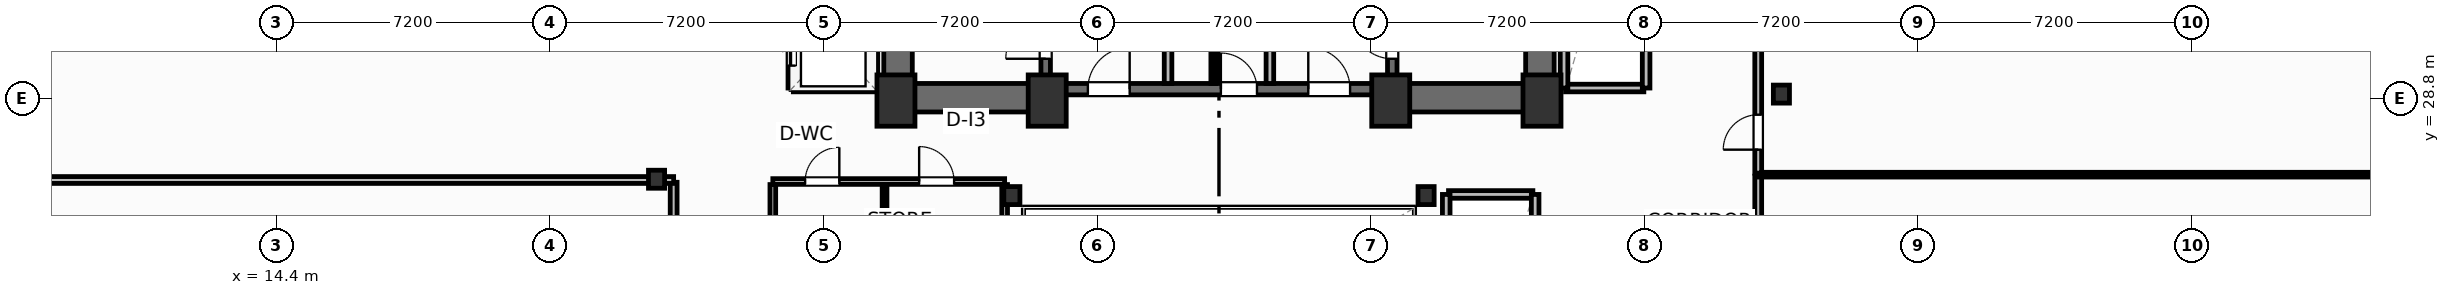
"""IFC4 building model, lengths in metres.
Left out: names, types, materials, properties, quantities, classifications, styles, units other than length and angle.
Written with IfcOpenShell. Run it as: python <this file> out.ifc"""

import sys

from ifc_helpers import new_model, si_unit, direction, frame, frame_2d, origin, origin_2d, place, context, subcontext, project, spatial, rectangle, i_section, extrude, element, fill, save


model = new_model("IFC4")
c1 = context("Model", 3, precision=1e-05, world=origin(), true_north=direction((0.0, 1.0)))
c2 = subcontext(c1, "Body", "Model", "MODEL_VIEW")
j1 = project(units=[si_unit("LENGTHUNIT", "METRE"), si_unit("PLANEANGLEUNIT", "RADIAN")], contexts=[c1])
p1 = place(None, origin())
s1 = spatial("IfcSite", under=j1, at=p1, CompositionType="ELEMENT")
p2 = place(p1, origin())
s2 = spatial("IfcBuilding", under=s1, at=p2, CompositionType="ELEMENT")
p3 = place(p2, frame((0.0, 0.0, 83.6)))
s3 = spatial("IfcBuildingStorey", under=s2, at=p3, CompositionType="ELEMENT", Elevation=83.6)
for number, where, z_axis, x_axis in (
    (1, (30.7, 28.75, 0.0), (0.0, 0.0, 1.0), (1.0, 0.0, 0.0)),
    (2, (34.68, 28.75, 0.0), (0.0, 0.0, 1.0), (1.0, 0.0, 0.0)),
    (3, (43.72, 28.75, 0.0), (0.0, 0.0, 1.0), (1.0, 0.0, 0.0)),
    (4, (47.7, 28.75, 0.0), (0.0, 0.0, 1.0), (1.0, 0.0, 0.0)),
):
    element("IfcColumn", number, at=place(p3, frame(where, z_axis=z_axis, x_axis=x_axis)), inside=s3, PredefinedType="COLUMN", context=c2, shape_type="SweptSolid", body=[
        extrude(rectangle(XDim=1.0, YDim=1.35, at=origin_2d()), origin(), (0.0, 0.0, 1.0), 3.7),
    ])
for number, where, z_axis, x_axis in (
    (5, (33.75, 26.25, 0.0), (0.0, 0.0, 1.0), (1.0, 0.0, 0.0)),
    (6, (44.65, 26.25, 0.0), (0.0, 0.0, 1.0), (1.0, 0.0, 0.0)),
    (7, (24.4, 26.68, 0.0), (0.0, 0.0, 1.0), (1.0, 0.0, 0.0)),
    (8, (54.0, 28.92, 0.0), (0.0, 0.0, 1.0), (1.0, 0.0, 0.0)),
):
    element("IfcColumn", number, at=place(p3, frame(where, z_axis=z_axis, x_axis=x_axis)), inside=s3, PredefinedType="COLUMN", context=c2, shape_type="SweptSolid", body=[
        extrude(i_section(OverallWidth=0.424, OverallDepth=0.474, WebThickness=0.048, FlangeThickness=0.077, FilletRadius=0.025, at=origin_2d()), origin(), (0.0, 0.0, 1.0), 3.7),
    ])
for number, where, z_axis, x_axis in (
    (9, (30.755, 29.2, 0.0), (0.0, 0.0, 1.0), (0.0, 1.0, 0.0)),
    (10, (47.645, 29.2, 0.0), (0.0, 0.0, 1.0), (0.0, 1.0, 0.0)),
):
    element("IfcWall", number, at=place(p3, frame(where, z_axis=z_axis, x_axis=x_axis)), inside=s3, PredefinedType="SHEAR", context=c2, shape_type="SweptSolid", body=[
        extrude(rectangle(XDim=9.22, YDim=0.75, at=frame_2d((4.61, 0.0))), origin(), (0.0, 0.0, 1.0), 3.45),
    ])
p4 = place(p3, frame((30.38, 28.825, 0.0), z_axis=(0.0, 0.0, 1.0), x_axis=(1.0, 0.0, 0.0)))
e11 = element("IfcWall", 11, at=p4, inside=s3, PredefinedType="SHEAR", context=c2, shape_type="SweptSolid", body=[
    extrude(rectangle(XDim=4.42, YDim=0.75, at=frame_2d((2.21, 0.0))), origin(), (0.0, 0.0, 1.0), 3.45),
])
p5 = place(p3, frame((43.6, 28.825, 0.0), z_axis=(0.0, 0.0, 1.0), x_axis=(1.0, 0.0, 0.0)))
e12 = element("IfcWall", 12, at=p5, inside=s3, PredefinedType="SHEAR", context=c2, shape_type="SweptSolid", body=[
    extrude(rectangle(XDim=4.42, YDim=0.75, at=frame_2d((2.21, 0.0))), origin(), (0.0, 0.0, 1.0), 3.45),
])
p6 = place(p3, frame((34.8, 29.05, 0.0), z_axis=(0.0, 0.0, 1.0), x_axis=(1.0, 0.0, 0.0)))
e13 = element("IfcWall", 13, at=p6, inside=s3, PredefinedType="SHEAR", context=c2, shape_type="SweptSolid", body=[
    extrude(rectangle(XDim=8.8, YDim=0.3, at=frame_2d((4.4, 0.0))), origin(), (0.0, 0.0, 1.0), 3.45),
])
p7 = place(p6, frame((0.95, 0.0, 0.0)))
e14 = element("IfcOpeningElement", 14, at=p7, cuts=e13, PredefinedType="OPENING", context=c2, shape_type="SweptSolid", body=[
    extrude(rectangle(XDim=1.1, YDim=2.15, at=frame_2d((0.55, 1.075))), frame((0.0, 0.16, 0.0), z_axis=(0.0, -1.0, 0.0), x_axis=(1.0, 0.0, 0.0)), (0.0, 0.0, 1.0), 0.32),
])
p8 = place(p6, frame((6.75, 0.0, 0.0)))
e15 = element("IfcOpeningElement", 15, at=p8, cuts=e13, PredefinedType="OPENING", context=c2, shape_type="SweptSolid", body=[
    extrude(rectangle(XDim=1.1, YDim=2.15, at=frame_2d((0.55, 1.075))), frame((0.0, 0.16, 0.0), z_axis=(0.0, -1.0, 0.0), x_axis=(1.0, 0.0, 0.0)), (0.0, 0.0, 1.0), 0.32),
])
p9 = place(p6, frame((4.45, 0.0, 0.0)))
e16 = element("IfcOpeningElement", 16, at=p9, cuts=e13, PredefinedType="OPENING", context=c2, shape_type="SweptSolid", body=[
    extrude(rectangle(XDim=0.95, YDim=2.15, at=frame_2d((0.475, 1.075))), frame((0.0, 0.16, 0.0), z_axis=(0.0, -1.0, 0.0), x_axis=(1.0, 0.0, 0.0)), (0.0, 0.0, 1.0), 0.32),
])
p10 = place(p3, frame((34.64, 29.2, 0.0), z_axis=(0.0, 0.0, 1.0), x_axis=(0.0, 1.0, 0.0)))
e17 = element("IfcWall", 17, at=p10, inside=s3, PredefinedType="SHEAR", context=c2, shape_type="SweptSolid", body=[
    extrude(rectangle(XDim=9.22, YDim=0.25, at=frame_2d((4.61, 0.0))), origin(), (0.0, 0.0, 1.0), 3.45),
])
p11 = place(p10, frame((0.65, 0.0, 0.0)))
e18 = element("IfcOpeningElement", 18, at=p11, cuts=e17, PredefinedType="OPENING", context=c2, shape_type="SweptSolid", body=[
    extrude(rectangle(XDim=1.05, YDim=2.15, at=frame_2d((0.525, 1.075))), frame((0.0, 0.135, 0.0), z_axis=(0.0, -1.0, 0.0), x_axis=(1.0, 0.0, 0.0)), (0.0, 0.0, 1.0), 0.27),
])
p12 = place(p3, frame((43.76, 29.2, 0.0), z_axis=(0.0, 0.0, 1.0), x_axis=(0.0, 1.0, 0.0)))
e19 = element("IfcWall", 19, at=p12, inside=s3, PredefinedType="SHEAR", context=c2, shape_type="SweptSolid", body=[
    extrude(rectangle(XDim=9.22, YDim=0.25, at=frame_2d((4.61, 0.0))), origin(), (0.0, 0.0, 1.0), 3.45),
])
p13 = place(p12, frame((0.65, 0.0, 0.0)))
e20 = element("IfcOpeningElement", 20, at=p13, cuts=e19, PredefinedType="OPENING", context=c2, shape_type="SweptSolid", body=[
    extrude(rectangle(XDim=1.05, YDim=2.15, at=frame_2d((0.525, 1.075))), frame((0.0, 0.135, 0.0), z_axis=(0.0, -1.0, 0.0), x_axis=(1.0, 0.0, 0.0)), (0.0, 0.0, 1.0), 0.27),
])
p14 = place(p3, frame((24.85, 23.03, 0.0), z_axis=(0.0, 0.0, 1.0), x_axis=(0.0, 1.0, 0.0)))
e21 = element("IfcWall", 21, at=p14, inside=s3, PredefinedType="PARTITIONING", context=c2, shape_type="SweptSolid", body=[
    extrude(rectangle(XDim=3.57, YDim=0.18, at=frame_2d((1.785, 0.0))), origin(), (0.0, 0.0, 1.0), 3.45),
])
p15 = place(p14, frame((1.5, 0.0, 0.0)))
e22 = element("IfcOpeningElement", 22, at=p15, cuts=e21, PredefinedType="OPENING", context=c2, shape_type="SweptSolid", body=[
    extrude(rectangle(XDim=0.92, YDim=2.05, at=frame_2d((0.46, 1.025))), frame((0.0, 0.1, 0.0), z_axis=(0.0, -1.0, 0.0), x_axis=(1.0, 0.0, 0.0)), (0.0, 0.0, 1.0), 0.2),
])
p16 = place(p3, frame((-0.086, 26.66, 0.0), z_axis=(0.0, 0.0, 1.0), x_axis=(1.0, 0.0, 0.0)))
e23 = element("IfcWall", 23, at=p16, inside=s3, PredefinedType="PARTITIONING", context=c2, shape_type="SweptSolid", body=[
    extrude(rectangle(XDim=24.936, YDim=0.18, at=frame_2d((12.468, 0.0))), origin(), (0.0, 0.0, 1.0), 2.662),
])
p17 = place(p3, frame((53.39, 19.24, 0.0), z_axis=(0.0, 0.0, 1.0), x_axis=(0.0, 1.0, 0.0)))
e24 = element("IfcWall", 24, at=p17, inside=s3, PredefinedType="PARTITIONING", context=c2, shape_type="SweptSolid", body=[
    extrude(rectangle(XDim=7.52, YDim=0.18, at=frame_2d((3.76, 0.0))), origin(), (0.0, 0.0, 1.0), 3.45),
])
p18 = place(p17, frame((2.1, 0.0, 0.0)))
e25 = element("IfcOpeningElement", 25, at=p18, cuts=e24, PredefinedType="OPENING", context=c2, shape_type="SweptSolid", body=[
    extrude(rectangle(XDim=0.92, YDim=2.05, at=frame_2d((0.46, 1.025))), frame((0.0, 0.1, 0.0), z_axis=(0.0, -1.0, 0.0), x_axis=(1.0, 0.0, 0.0)), (0.0, 0.0, 1.0), 0.2),
])
p19 = place(p3, frame((53.39, 26.8, 0.0), z_axis=(0.0, 0.0, 1.0), x_axis=(1.0, 0.0, 0.0)))
e26 = element("IfcWall", 26, at=p19, inside=s3, PredefinedType="PARTITIONING", context=c2, shape_type="SweptSolid", body=[
    extrude(rectangle(XDim=23.61, YDim=0.125, at=frame_2d((11.805, 0.0))), origin(), (0.0, 0.0, 1.0), 3.45),
])
p20 = place(p3, frame((53.39, 26.84, 0.0), z_axis=(0.0, 0.0, 1.0), x_axis=(0.0, 1.0, 0.0)))
e27 = element("IfcWall", 27, at=p20, inside=s3, PredefinedType="PARTITIONING", context=c2, shape_type="SweptSolid", body=[
    extrude(rectangle(XDim=12.46, YDim=0.18, at=frame_2d((6.23, 0.0))), origin(), (0.0, 0.0, 1.0), 3.45),
])
p21 = place(p20, frame((0.618, 0.0, 0.0)))
e28 = element("IfcOpeningElement", 28, at=p21, cuts=e27, PredefinedType="OPENING", context=c2, shape_type="SweptSolid", body=[
    extrude(rectangle(XDim=0.92, YDim=2.05, at=frame_2d((0.46, 1.025))), frame((0.0, 0.1, 0.0), z_axis=(0.0, -1.0, 0.0), x_axis=(1.0, 0.0, 0.0)), (0.0, 0.0, 1.0), 0.2),
])
for number, where, z_axis, x_axis in (
    (29, (37.86, 29.2, 0.0), (0.0, 0.0, 1.0), (0.0, 1.0, 0.0)),
    (30, (40.54, 29.2, 0.0), (0.0, 0.0, 1.0), (0.0, 1.0, 0.0)),
):
    element("IfcWall", number, at=place(p3, frame(where, z_axis=z_axis, x_axis=x_axis)), inside=s3, PredefinedType="PARTITIONING", context=c2, shape_type="SweptSolid", body=[
        extrude(rectangle(XDim=5.18, YDim=0.2, at=frame_2d((2.59, 0.0))), origin(), (0.0, 0.0, 1.0), 3.45),
    ])
p22 = place(p3, frame((39.05, 29.2, 0.0), z_axis=(0.0, 0.0, 1.0), x_axis=(0.0, 1.0, 0.0)))
e31 = element("IfcWall", 31, at=p22, inside=s3, PredefinedType="PARTITIONING", context=c2, shape_type="SweptSolid", body=[
    extrude(rectangle(XDim=5.22, YDim=0.125, at=frame_2d((2.61, 0.0))), origin(), (0.0, 0.0, 1.0), 3.45),
])
p23 = place(p22, frame((2.05, 0.0, 0.0)))
e32 = element("IfcOpeningElement", 32, at=p23, cuts=e31, PredefinedType="OPENING", context=c2, shape_type="SweptSolid", body=[
    extrude(rectangle(XDim=0.85, YDim=2.05, at=frame_2d((0.425, 1.025))), frame((0.0, 0.073, 0.0), z_axis=(0.0, -1.0, 0.0), x_axis=(1.0, 0.0, 0.0)), (0.0, 0.0, 1.0), 0.145),
])
p24 = place(p3, frame((27.46, 26.62, 0.0), z_axis=(0.0, 0.0, 1.0), x_axis=(1.0, 0.0, 0.0)))
e33 = element("IfcWall", 33, at=p24, inside=s3, PredefinedType="PARTITIONING", context=c2, shape_type="SweptSolid", body=[
    extrude(rectangle(XDim=6.1, YDim=0.15, at=frame_2d((3.05, 0.0))), origin(), (0.0, 0.0, 1.0), 2.662),
])
p25 = place(p24, frame((0.85, 0.0, 0.0)))
e34 = element("IfcOpeningElement", 34, at=p25, cuts=e33, PredefinedType="OPENING", context=c2, shape_type="SweptSolid", body=[
    extrude(rectangle(XDim=0.9, YDim=2.05, at=frame_2d((0.45, 1.025))), frame((0.0, 0.085, 0.0), z_axis=(0.0, -1.0, 0.0), x_axis=(1.0, 0.0, 0.0)), (0.0, 0.0, 1.0), 0.17),
])
p26 = place(p24, frame((3.85, 0.0, 0.0)))
e35 = element("IfcOpeningElement", 35, at=p26, cuts=e33, PredefinedType="OPENING", context=c2, shape_type="SweptSolid", body=[
    extrude(rectangle(XDim=0.92, YDim=2.05, at=frame_2d((0.46, 1.025))), frame((0.0, 0.085, 0.0), z_axis=(0.0, -1.0, 0.0), x_axis=(1.0, 0.0, 0.0)), (0.0, 0.0, 1.0), 0.17),
])
p27 = place(p3, frame((30.4, 23.0, 0.0), z_axis=(0.0, 0.0, 1.0), x_axis=(0.0, 1.0, 0.0)))
e36 = element("IfcWall", 36, at=p27, inside=s3, PredefinedType="PARTITIONING", context=c2, shape_type="SweptSolid", body=[
    extrude(rectangle(XDim=3.54, YDim=0.125, at=frame_2d((1.77, 0.0))), origin(), (0.0, 0.0, 1.0), 3.45),
])
p28 = place(p3, frame((27.46, 19.38, 0.0), z_axis=(0.0, 0.0, 1.0), x_axis=(0.0, 1.0, 0.0)))
e37 = element("IfcWall", 37, at=p28, inside=s3, PredefinedType="PARTITIONING", context=c2, shape_type="SweptSolid", body=[
    extrude(rectangle(XDim=7.16, YDim=0.15, at=frame_2d((3.58, 0.0))), origin(), (0.0, 0.0, 1.0), 3.45),
])
p29 = place(p28, frame((1.1, 0.0, 0.0)))
e38 = element("IfcOpeningElement", 38, at=p29, cuts=e37, PredefinedType="OPENING", context=c2, shape_type="SweptSolid", body=[
    extrude(rectangle(XDim=0.95, YDim=2.05, at=frame_2d((0.475, 1.025))), frame((0.0, 0.085, 0.0), z_axis=(0.0, -1.0, 0.0), x_axis=(1.0, 0.0, 0.0)), (0.0, 0.0, 1.0), 0.17),
])
p30 = place(p3, frame((33.56, 19.38, 0.0), z_axis=(0.0, 0.0, 1.0), x_axis=(0.0, 1.0, 0.0)))
e39 = element("IfcWall", 39, at=p30, inside=s3, PredefinedType="PARTITIONING", context=c2, shape_type="SweptSolid", body=[
    extrude(rectangle(XDim=7.16, YDim=0.15, at=frame_2d((3.58, 0.0))), origin(), (0.0, 0.0, 1.0), 2.824),
])
p31 = place(p3, frame((28.0, 29.08, 0.0), z_axis=(0.0, 0.0, 1.0), x_axis=(1.0, 0.0, 0.0)))
e40 = element("IfcWall", 40, at=p31, inside=s3, PredefinedType="PARTITIONING", context=c2, shape_type="SweptSolid", body=[
    extrude(rectangle(XDim=2.1, YDim=0.2, at=frame_2d((1.05, 0.0))), origin(), (0.0, 0.0, 1.0), 3.45),
])
p32 = place(p3, frame((30.12, 29.08, 0.0), z_axis=(0.0, 0.0, 1.0), x_axis=(0.0, 1.0, 0.0)))
e41 = element("IfcWall", 41, at=p32, inside=s3, PredefinedType="PARTITIONING", context=c2, shape_type="SweptSolid", body=[
    extrude(rectangle(XDim=6.89, YDim=0.2, at=frame_2d((3.445, 0.0))), origin(), (0.0, 0.0, 1.0), 3.45),
])
p33 = place(p3, frame((27.96, 29.08, 0.0), z_axis=(0.0, 0.0, 1.0), x_axis=(0.0, 1.0, 0.0)))
e42 = element("IfcWall", 42, at=p33, inside=s3, PredefinedType="PARTITIONING", context=c2, shape_type="SweptSolid", body=[
    extrude(rectangle(XDim=6.89, YDim=0.2, at=frame_2d((3.445, 0.0))), origin(), (0.0, 0.0, 1.0), 3.45),
])
p34 = place(p33, frame((0.59, 0.0, 0.0)))
e43 = element("IfcOpeningElement", 43, at=p34, cuts=e42, PredefinedType="OPENING", context=c2, shape_type="SweptSolid", body=[
    extrude(rectangle(XDim=1.1, YDim=2.15, at=frame_2d((0.55, 1.075))), frame((0.0, 0.11, 0.0), z_axis=(0.0, -1.0, 0.0), x_axis=(1.0, 0.0, 0.0)), (0.0, 0.0, 1.0), 0.22),
])
p35 = place(p33, frame((2.89, 0.0, 0.0)))
e44 = element("IfcOpeningElement", 44, at=p35, cuts=e42, PredefinedType="OPENING", context=c2, shape_type="SweptSolid", body=[
    extrude(rectangle(XDim=1.1, YDim=2.15, at=frame_2d((0.55, 1.075))), frame((0.0, 0.11, 0.0), z_axis=(0.0, -1.0, 0.0), x_axis=(1.0, 0.0, 0.0)), (0.0, 0.0, 1.0), 0.22),
])
p36 = place(p33, frame((5.19, 0.0, 0.0)))
e45 = element("IfcOpeningElement", 45, at=p36, cuts=e42, PredefinedType="OPENING", context=c2, shape_type="SweptSolid", body=[
    extrude(rectangle(XDim=1.1, YDim=2.15, at=frame_2d((0.55, 1.075))), frame((0.0, 0.11, 0.0), z_axis=(0.0, -1.0, 0.0), x_axis=(1.0, 0.0, 0.0)), (0.0, 0.0, 1.0), 0.22),
])
p37 = place(p3, frame((48.32, 29.08, 0.0), z_axis=(0.0, 0.0, 1.0), x_axis=(1.0, 0.0, 0.0)))
e46 = element("IfcWall", 46, at=p37, inside=s3, PredefinedType="PARTITIONING", context=c2, shape_type="SweptSolid", body=[
    extrude(rectangle(XDim=2.06, YDim=0.2, at=frame_2d((1.03, 0.0))), origin(), (0.0, 0.0, 1.0), 2.662),
])
for number, where, z_axis, x_axis in (
    (47, (48.28, 29.08, 0.0), (0.0, 0.0, 1.0), (0.0, 1.0, 0.0)),
    (48, (50.44, 29.08, 0.0), (0.0, 0.0, 1.0), (0.0, 1.0, 0.0)),
):
    element("IfcWall", number, at=place(p3, frame(where, z_axis=z_axis, x_axis=x_axis)), inside=s3, PredefinedType="PARTITIONING", context=c2, shape_type="SweptSolid", body=[
        extrude(rectangle(XDim=6.89, YDim=0.2, at=frame_2d((3.445, 0.0))), origin(), (0.0, 0.0, 1.0), 3.45),
    ])
p38 = place(p3, frame((45.24, 26.28, 0.0), z_axis=(0.0, 0.0, 1.0), x_axis=(1.0, 0.0, 0.0)))
e49 = element("IfcWall", 49, at=p38, inside=s3, PredefinedType="PARTITIONING", context=c2, shape_type="SweptSolid", body=[
    extrude(rectangle(XDim=2.22, YDim=0.2, at=frame_2d((1.11, 0.0))), origin(), (0.0, 0.0, 1.0), 3.45),
])
for number, where, z_axis, x_axis in (
    (50, (45.18, 19.38, 0.0), (0.0, 0.0, 1.0), (0.0, 1.0, 0.0)),
    (51, (47.52, 19.38, 0.0), (0.0, 0.0, 1.0), (0.0, 1.0, 0.0)),
):
    element("IfcWall", number, at=place(p3, frame(where, z_axis=z_axis, x_axis=x_axis)), inside=s3, PredefinedType="PARTITIONING", context=c2, shape_type="SweptSolid", body=[
        extrude(rectangle(XDim=6.9, YDim=0.2, at=frame_2d((3.45, 0.0))), origin(), (0.0, 0.0, 1.0), 3.45),
    ])
p39 = place(p21, origin())
e52 = element("IfcDoor", 52, at=p39, inside=s3, OperationType="SINGLE_SWING_LEFT", PredefinedType="DOOR", context=c2, shape_type="SweptSolid", body=[
    extrude(rectangle(XDim=0.92, YDim=2.05, at=frame_2d((0.46, 1.025))), frame((0.0, 0.025, 0.0), z_axis=(0.0, -1.0, 0.0), x_axis=(1.0, 0.0, 0.0)), (0.0, 0.0, 1.0), 0.05),
])
fill(e28, e52)
p40 = place(p11, origin())
e53 = element("IfcDoor", 53, at=p40, inside=s3, OperationType="SINGLE_SWING_LEFT", PredefinedType="DOOR", context=c2, shape_type="SweptSolid", body=[
    extrude(rectangle(XDim=1.05, YDim=2.15, at=frame_2d((0.525, 1.075))), frame((0.0, 0.025, 0.0), z_axis=(0.0, -1.0, 0.0), x_axis=(1.0, 0.0, 0.0)), (0.0, 0.0, 1.0), 0.05),
])
fill(e18, e53)
p41 = place(p13, origin())
e54 = element("IfcDoor", 54, at=p41, inside=s3, OperationType="SINGLE_SWING_RIGHT", PredefinedType="DOOR", context=c2, shape_type="SweptSolid", body=[
    extrude(rectangle(XDim=1.05, YDim=2.15, at=frame_2d((0.525, 1.075))), frame((0.0, 0.025, 0.0), z_axis=(0.0, -1.0, 0.0), x_axis=(1.0, 0.0, 0.0)), (0.0, 0.0, 1.0), 0.05),
])
fill(e20, e54)
p42 = place(p7, origin())
e55 = element("IfcDoor", 55, at=p42, inside=s3, OperationType="SINGLE_SWING_RIGHT", PredefinedType="DOOR", context=c2, shape_type="SweptSolid", body=[
    extrude(rectangle(XDim=1.1, YDim=2.15, at=frame_2d((0.55, 1.075))), frame((0.0, 0.025, 0.0), z_axis=(0.0, -1.0, 0.0), x_axis=(1.0, 0.0, 0.0)), (0.0, 0.0, 1.0), 0.05),
])
fill(e14, e55)
p43 = place(p8, origin())
e56 = element("IfcDoor", 56, at=p43, inside=s3, OperationType="SINGLE_SWING_LEFT", PredefinedType="DOOR", context=c2, shape_type="SweptSolid", body=[
    extrude(rectangle(XDim=1.1, YDim=2.15, at=frame_2d((0.55, 1.075))), frame((0.0, 0.025, 0.0), z_axis=(0.0, -1.0, 0.0), x_axis=(1.0, 0.0, 0.0)), (0.0, 0.0, 1.0), 0.05),
])
fill(e15, e56)
p44 = place(p9, origin())
e57 = element("IfcDoor", 57, at=p44, inside=s3, OperationType="SINGLE_SWING_LEFT", PredefinedType="DOOR", context=c2, shape_type="SweptSolid", body=[
    extrude(rectangle(XDim=0.95, YDim=2.15, at=frame_2d((0.475, 1.075))), frame((0.0, 0.025, 0.0), z_axis=(0.0, -1.0, 0.0), x_axis=(1.0, 0.0, 0.0)), (0.0, 0.0, 1.0), 0.05),
])
fill(e16, e57)
p45 = place(p25, origin())
e58 = element("IfcDoor", 58, at=p45, inside=s3, OperationType="SINGLE_SWING_RIGHT", PredefinedType="DOOR", context=c2, shape_type="SweptSolid", body=[
    extrude(rectangle(XDim=0.9, YDim=2.05, at=frame_2d((0.45, 1.025))), frame((0.0, 0.025, 0.0), z_axis=(0.0, -1.0, 0.0), x_axis=(1.0, 0.0, 0.0)), (0.0, 0.0, 1.0), 0.05),
])
fill(e34, e58)
p46 = place(p26, origin())
e59 = element("IfcDoor", 59, at=p46, inside=s3, OperationType="SINGLE_SWING_LEFT", PredefinedType="DOOR", context=c2, shape_type="SweptSolid", body=[
    extrude(rectangle(XDim=0.92, YDim=2.05, at=frame_2d((0.46, 1.025))), frame((0.0, 0.025, 0.0), z_axis=(0.0, -1.0, 0.0), x_axis=(1.0, 0.0, 0.0)), (0.0, 0.0, 1.0), 0.05),
])
fill(e35, e59)
p47 = place(p34, origin())
e60 = element("IfcDoor", 60, at=p47, inside=s3, OperationType="SLIDING_TO_LEFT", PredefinedType="DOOR", context=c2, shape_type="SweptSolid", body=[
    extrude(rectangle(XDim=1.1, YDim=2.15, at=frame_2d((0.55, 1.075))), frame((0.0, 0.025, 0.0), z_axis=(0.0, -1.0, 0.0), x_axis=(1.0, 0.0, 0.0)), (0.0, 0.0, 1.0), 0.05),
])
fill(e43, e60)
save(model, sys.argv[1])
